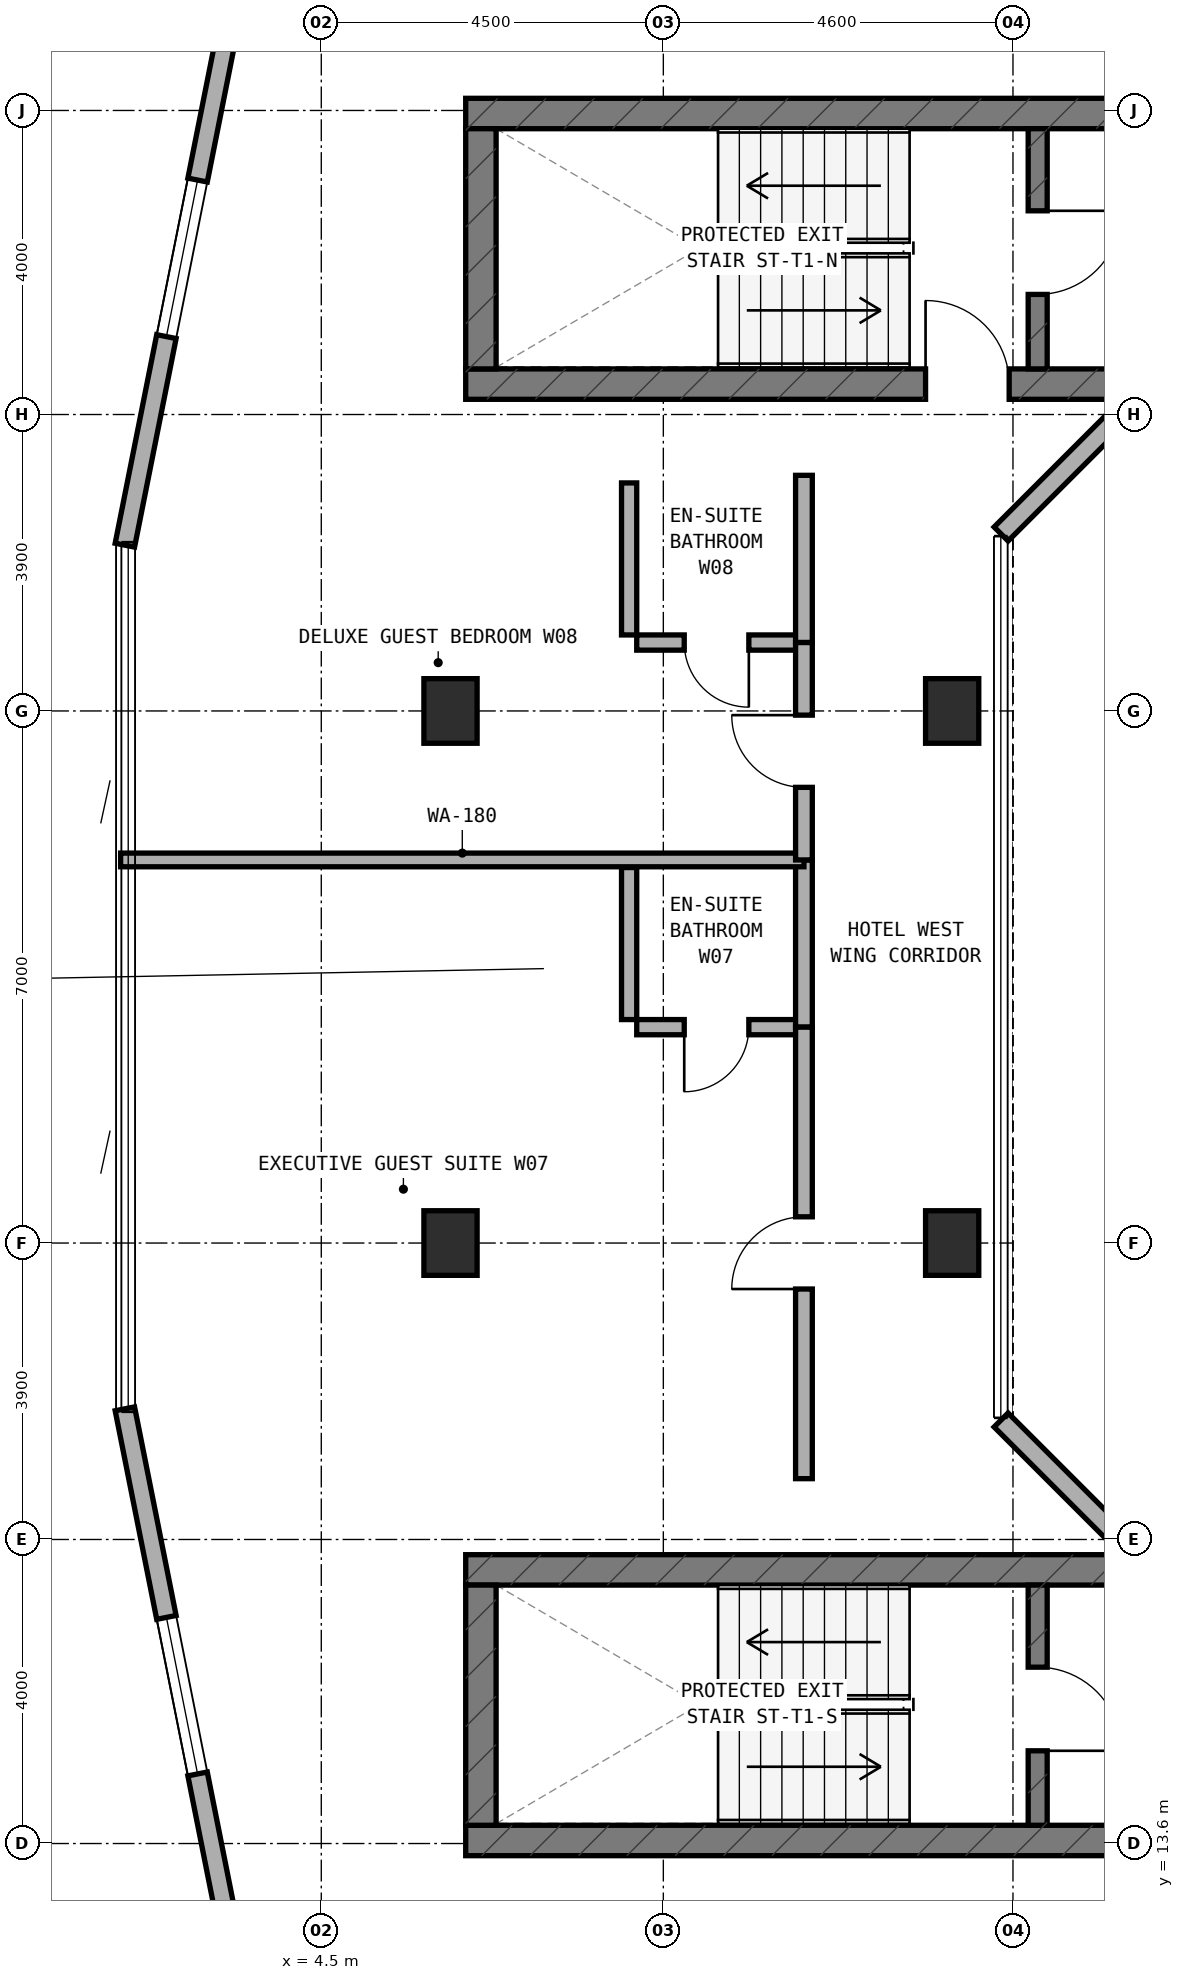
"""IFC4 building model, lengths in metres.
Left out: names, types, materials, properties, quantities, classifications, styles, units other than length and angle.
Written with IfcOpenShell. Run it as: python <this file> out.ifc"""

import sys

from ifc_helpers import new_model, si_unit, direction, frame, frame_2d, origin, origin_2d, place, context, subcontext, project, spatial, rectangle, extrude, element, fill, save


model = new_model("IFC4")
c1 = context("Model", 3, precision=1e-05, world=origin(), true_north=direction((0.0, 1.0)))
c2 = subcontext(c1, "Body", "Model", "MODEL_VIEW")
j1 = project(units=[si_unit("LENGTHUNIT", "METRE"), si_unit("PLANEANGLEUNIT", "RADIAN")], contexts=[c1])
p1 = place(None, origin())
s1 = spatial("IfcSite", under=j1, at=p1, CompositionType="ELEMENT")
p2 = place(p1, origin())
s2 = spatial("IfcBuilding", under=s1, at=p2, CompositionType="ELEMENT")
p3 = place(p2, frame((0.0, 0.0, 202.7)))
s3 = spatial("IfcBuildingStorey", under=s2, at=p3, CompositionType="ELEMENT", Elevation=202.7)
p4 = place(p3, frame((6.4, 32.8, 0.0), z_axis=(0.0, 0.0, 1.0), x_axis=(1.0, 0.0, 0.0)))
e1 = element("IfcWall", 1, at=p4, inside=s3, PredefinedType="SHEAR", context=c2, shape_type="SweptSolid", body=[
    extrude(rectangle(XDim=24.4, YDim=0.4, at=frame_2d((12.2, 0.0))), origin(), (0.0, 0.0, 1.0), 3.6),
])
p5 = place(p4, frame((6.05, 0.0, 0.0)))
e2 = element("IfcOpeningElement", 2, at=p5, cuts=e1, PredefinedType="OPENING", context=c2, shape_type="SweptSolid", body=[
    extrude(rectangle(XDim=1.1, YDim=2.15, at=frame_2d((0.55, 1.075))), frame((0.0, 0.21, 0.0), z_axis=(0.0, -1.0, 0.0), x_axis=(1.0, 0.0, 0.0)), (0.0, 0.0, 1.0), 0.42),
])
p6 = place(p3, frame((6.4, 36.36, 0.0), z_axis=(0.0, 0.0, 1.0), x_axis=(1.0, 0.0, 0.0)))
e3 = element("IfcWall", 3, at=p6, inside=s3, PredefinedType="SHEAR", context=c2, shape_type="SweptSolid", body=[
    extrude(rectangle(XDim=24.4, YDim=0.4, at=frame_2d((12.2, 0.0))), origin(), (0.0, 0.0, 1.0), 3.6),
])
p7 = place(p6, frame((9.15, 0.0, 0.0)))
e4 = element("IfcOpeningElement", 4, at=p7, cuts=e3, PredefinedType="OPENING", context=c2, shape_type="SweptSolid", body=[
    extrude(rectangle(XDim=1.2, YDim=2.15, at=frame_2d((0.6, 1.075))), frame((0.0, 0.21, 0.0), z_axis=(0.0, -1.0, 0.0), x_axis=(1.0, 0.0, 0.0)), (0.0, 0.0, 1.0), 0.42),
])
p8 = place(p6, frame((19.2, 0.0, 0.0)))
e5 = element("IfcOpeningElement", 5, at=p8, cuts=e3, PredefinedType="OPENING", context=c2, shape_type="SweptSolid", body=[
    extrude(rectangle(XDim=0.85, YDim=2.1, at=frame_2d((0.425, 1.05))), frame((0.0, 0.21, 0.0), z_axis=(0.0, -1.0, 0.0), x_axis=(1.0, 0.0, 0.0)), (0.0, 0.0, 1.0), 0.42),
])
p9 = place(p6, frame((16.94, 0.0, 0.0)))
e6 = element("IfcOpeningElement", 6, at=p9, cuts=e3, PredefinedType="OPENING", context=c2, shape_type="SweptSolid", body=[
    extrude(rectangle(XDim=0.85, YDim=2.1, at=frame_2d((0.425, 1.05))), frame((0.0, 0.21, 0.0), z_axis=(0.0, -1.0, 0.0), x_axis=(1.0, 0.0, 0.0)), (0.0, 0.0, 1.0), 0.42),
])
p10 = place(p3, frame((6.6, 33.0, 0.0), z_axis=(0.0, 0.0, 1.0), x_axis=(0.0, 1.0, 0.0)))
e7 = element("IfcWall", 7, at=p10, inside=s3, PredefinedType="SHEAR", context=c2, shape_type="SweptSolid", body=[
    extrude(rectangle(XDim=3.16, YDim=0.4, at=frame_2d((1.58, 0.0))), origin(), (0.0, 0.0, 1.0), 3.6),
])
p11 = place(p3, frame((13.925, 33.0, 0.0), z_axis=(0.0, 0.0, 1.0), x_axis=(0.0, 1.0, 0.0)))
e8 = element("IfcWall", 8, at=p11, inside=s3, PredefinedType="STANDARD", context=c2, shape_type="SweptSolid", body=[
    extrude(rectangle(XDim=3.16, YDim=0.25, at=frame_2d((1.58, 0.0))), origin(), (0.0, 0.0, 1.0), 3.32),
])
p12 = place(p11, frame((0.98, 0.0, 0.0)))
e9 = element("IfcOpeningElement", 9, at=p12, cuts=e8, PredefinedType="OPENING", context=c2, shape_type="SweptSolid", body=[
    extrude(rectangle(XDim=1.1, YDim=2.15, at=frame_2d((0.55, 1.075))), frame((0.0, 0.135, 0.0), z_axis=(0.0, -1.0, 0.0), x_axis=(1.0, 0.0, 0.0)), (0.0, 0.0, 1.0), 0.27),
])
p13 = place(p3, frame((6.4, 13.64, 0.0), z_axis=(0.0, 0.0, 1.0), x_axis=(1.0, 0.0, 0.0)))
e10 = element("IfcWall", 10, at=p13, inside=s3, PredefinedType="SHEAR", context=c2, shape_type="SweptSolid", body=[
    extrude(rectangle(XDim=24.4, YDim=0.4, at=frame_2d((12.2, 0.0))), origin(), (0.0, 0.0, 1.0), 3.6),
])
p14 = place(p13, frame((9.15, 0.0, 0.0)))
e11 = element("IfcOpeningElement", 11, at=p14, cuts=e10, PredefinedType="OPENING", context=c2, shape_type="SweptSolid", body=[
    extrude(rectangle(XDim=1.2, YDim=2.15, at=frame_2d((0.6, 1.075))), frame((0.0, 0.21, 0.0), z_axis=(0.0, -1.0, 0.0), x_axis=(1.0, 0.0, 0.0)), (0.0, 0.0, 1.0), 0.42),
])
p15 = place(p13, frame((16.94, 0.0, 0.0)))
e12 = element("IfcOpeningElement", 12, at=p15, cuts=e10, PredefinedType="OPENING", context=c2, shape_type="SweptSolid", body=[
    extrude(rectangle(XDim=0.85, YDim=2.1, at=frame_2d((0.425, 1.05))), frame((0.0, 0.21, 0.0), z_axis=(0.0, -1.0, 0.0), x_axis=(1.0, 0.0, 0.0)), (0.0, 0.0, 1.0), 0.42),
])
p16 = place(p13, frame((18.783, 0.0, 0.0)))
e13 = element("IfcOpeningElement", 13, at=p16, cuts=e10, PredefinedType="OPENING", context=c2, shape_type="SweptSolid", body=[
    extrude(rectangle(XDim=1.1, YDim=2.15, at=frame_2d((0.55, 1.075))), frame((0.0, 0.21, 0.0), z_axis=(0.0, -1.0, 0.0), x_axis=(1.0, 0.0, 0.0)), (0.0, 0.0, 1.0), 0.42),
])
p17 = place(p13, frame((20.65, 0.0, 0.0)))
e14 = element("IfcOpeningElement", 14, at=p17, cuts=e10, PredefinedType="OPENING", context=c2, shape_type="SweptSolid", body=[
    extrude(rectangle(XDim=1.1, YDim=2.15, at=frame_2d((0.55, 1.075))), frame((0.0, 0.21, 0.0), z_axis=(0.0, -1.0, 0.0), x_axis=(1.0, 0.0, 0.0)), (0.0, 0.0, 1.0), 0.42),
])
p18 = place(p13, frame((22.517, 0.0, 0.0)))
e15 = element("IfcOpeningElement", 15, at=p18, cuts=e10, PredefinedType="OPENING", context=c2, shape_type="SweptSolid", body=[
    extrude(rectangle(XDim=1.1, YDim=2.15, at=frame_2d((0.55, 1.075))), frame((0.0, 0.21, 0.0), z_axis=(0.0, -1.0, 0.0), x_axis=(1.0, 0.0, 0.0)), (0.0, 0.0, 1.0), 0.42),
])
p19 = place(p3, frame((6.4, 17.2, 0.0), z_axis=(0.0, 0.0, 1.0), x_axis=(1.0, 0.0, 0.0)))
e16 = element("IfcWall", 16, at=p19, inside=s3, PredefinedType="SHEAR", context=c2, shape_type="SweptSolid", body=[
    extrude(rectangle(XDim=24.4, YDim=0.4, at=frame_2d((12.2, 0.0))), origin(), (0.0, 0.0, 1.0), 3.6),
])
p20 = place(p3, frame((6.6, 13.84, 0.0), z_axis=(0.0, 0.0, 1.0), x_axis=(0.0, 1.0, 0.0)))
e17 = element("IfcWall", 17, at=p20, inside=s3, PredefinedType="SHEAR", context=c2, shape_type="SweptSolid", body=[
    extrude(rectangle(XDim=3.16, YDim=0.4, at=frame_2d((1.58, 0.0))), origin(), (0.0, 0.0, 1.0), 3.6),
])
p21 = place(p3, frame((13.925, 13.84, 0.0), z_axis=(0.0, 0.0, 1.0), x_axis=(0.0, 1.0, 0.0)))
e18 = element("IfcWall", 18, at=p21, inside=s3, PredefinedType="STANDARD", context=c2, shape_type="SweptSolid", body=[
    extrude(rectangle(XDim=3.16, YDim=0.25, at=frame_2d((1.58, 0.0))), origin(), (0.0, 0.0, 1.0), 3.32),
])
p22 = place(p21, frame((0.98, 0.0, 0.0)))
e19 = element("IfcOpeningElement", 19, at=p22, cuts=e18, PredefinedType="OPENING", context=c2, shape_type="SweptSolid", body=[
    extrude(rectangle(XDim=1.1, YDim=2.15, at=frame_2d((0.55, 1.075))), frame((0.0, 0.135, 0.0), z_axis=(0.0, -1.0, 0.0), x_axis=(1.0, 0.0, 0.0)), (0.0, 0.0, 1.0), 0.27),
])
for number, where, z_axis, x_axis in (
    (20, (6.2, 21.5, 0.0), (0.0, 0.0, 1.0), (1.0, 0.0, 0.0)),
    (21, (6.2, 28.5, 0.0), (0.0, 0.0, 1.0), (1.0, 0.0, 0.0)),
    (22, (12.8, 21.5, 0.0), (0.0, 0.0, 1.0), (1.0, 0.0, 0.0)),
    (23, (12.8, 28.5, 0.0), (0.0, 0.0, 1.0), (1.0, 0.0, 0.0)),
):
    element("IfcColumn", number, at=place(p3, frame(where, z_axis=z_axis, x_axis=x_axis)), inside=s3, PredefinedType="COLUMN", context=c2, shape_type="SweptSolid", body=[
        extrude(rectangle(XDim=0.7, YDim=0.85, at=origin_2d()), origin(), (0.0, 0.0, 1.0), 3.6),
    ])
p23 = place(p3, frame((3.629, 39.283, 0.0), z_axis=(0.0, 0.0, 1.0), x_axis=(-0.195291715883, -0.980745199176, 0.0)))
e24 = element("IfcWall", 24, at=p23, inside=s3, PredefinedType="STANDARD", context=c2, shape_type="SweptSolid", body=[
    extrude(rectangle(XDim=8.771, YDim=0.26, at=frame_2d((4.385, 0.0))), origin(), (0.0, 0.0, 1.0), 3.32),
])
p24 = place(p23, frame((3.873, 0.0, 0.85)))
e25 = element("IfcOpeningElement", 25, at=p24, cuts=e24, PredefinedType="OPENING", context=c2, shape_type="SweptSolid", body=[
    extrude(rectangle(XDim=2.1, YDim=1.5, at=frame_2d((1.05, 0.75))), frame((0.0, 0.14, 0.0), z_axis=(0.0, -1.0, 0.0), x_axis=(1.0, 0.0, 0.0)), (0.0, 0.0, 1.0), 0.28),
])
p25 = place(p3, frame((1.916, 19.319, 0.0), z_axis=(0.0, 0.0, 1.0), x_axis=(0.195291715883, -0.980745199176, 0.0)))
e26 = element("IfcWall", 26, at=p25, inside=s3, PredefinedType="STANDARD", context=c2, shape_type="SweptSolid", body=[
    extrude(rectangle(XDim=8.771, YDim=0.26, at=frame_2d((4.385, 0.0))), origin(), (0.0, 0.0, 1.0), 3.32),
])
p26 = place(p25, frame((2.798, 0.0, 0.85)))
e27 = element("IfcOpeningElement", 27, at=p26, cuts=e26, PredefinedType="OPENING", context=c2, shape_type="SweptSolid", body=[
    extrude(rectangle(XDim=2.1, YDim=1.5, at=frame_2d((1.05, 0.75))), frame((0.0, 0.14, 0.0), z_axis=(0.0, -1.0, 0.0), x_axis=(1.0, 0.0, 0.0)), (0.0, 0.0, 1.0), 0.28),
])
for number, where, z_axis, x_axis in (
    (28, (15.278, 32.662, 0.0), (0.0, 0.0, 1.0), (-0.707, -0.707, 0.0)),
    (29, (13.444, 19.172, 0.0), (0.0, 0.0, 1.0), (0.707, -0.707, 0.0)),
):
    element("IfcWall", number, at=place(p3, frame(where, z_axis=z_axis, x_axis=x_axis)), inside=s3, PredefinedType="STANDARD", context=c2, shape_type="SweptSolid", body=[
        extrude(rectangle(XDim=2.594, YDim=0.26, at=frame_2d((1.297, 0.0))), origin(), (0.0, 0.0, 1.0), 3.32),
    ])
p27 = place(p3, frame((8.65, 24.34, 0.0), z_axis=(0.0, 0.0, 1.0), x_axis=(1.0, 0.0, 0.0)))
e30 = element("IfcWall", 30, at=p27, inside=s3, PredefinedType="PLUMBINGWALL", context=c2, shape_type="SweptSolid", body=[
    extrude(rectangle(XDim=2.1, YDim=0.2, at=frame_2d((1.05, 0.0))), origin(), (0.0, 0.0, 1.0), 3.32),
])
p28 = place(p27, frame((0.625, 0.0, 0.0)))
e31 = element("IfcOpeningElement", 31, at=p28, cuts=e30, PredefinedType="OPENING", context=c2, shape_type="SweptSolid", body=[
    extrude(rectangle(XDim=0.85, YDim=2.1, at=frame_2d((0.425, 1.05))), frame((0.0, 0.11, 0.0), z_axis=(0.0, -1.0, 0.0), x_axis=(1.0, 0.0, 0.0)), (0.0, 0.0, 1.0), 0.22),
])
p29 = place(p3, frame((8.55, 24.44, 0.0), z_axis=(0.0, 0.0, 1.0), x_axis=(0.0, 1.0, 0.0)))
e32 = element("IfcWall", 32, at=p29, inside=s3, PredefinedType="PLUMBINGWALL", context=c2, shape_type="SweptSolid", body=[
    extrude(rectangle(XDim=2.0, YDim=0.2, at=frame_2d((1.0, 0.0))), origin(), (0.0, 0.0, 1.0), 3.32),
])
p30 = place(p3, frame((10.85, 24.34, 0.0), z_axis=(0.0, 0.0, 1.0), x_axis=(0.0, 1.0, 0.0)))
e33 = element("IfcWall", 33, at=p30, inside=s3, PredefinedType="SOLIDWALL", context=c2, shape_type="SweptSolid", body=[
    extrude(rectangle(XDim=2.2, YDim=0.22, at=frame_2d((1.1, 0.0))), origin(), (0.0, 0.0, 1.0), 3.32),
])
p31 = place(p3, frame((10.85, 18.4, 0.0), z_axis=(0.0, 0.0, 1.0), x_axis=(0.0, 1.0, 0.0)))
e34 = element("IfcWall", 34, at=p31, inside=s3, PredefinedType="SOLIDWALL", context=c2, shape_type="SweptSolid", body=[
    extrude(rectangle(XDim=5.94, YDim=0.22, at=frame_2d((2.97, 0.0))), origin(), (0.0, 0.0, 1.0), 2.695),
])
p32 = place(p31, frame((2.495, 0.0, 0.0)))
e35 = element("IfcOpeningElement", 35, at=p32, cuts=e34, PredefinedType="OPENING", context=c2, shape_type="SweptSolid", body=[
    extrude(rectangle(XDim=0.95, YDim=2.1, at=frame_2d((0.475, 1.05))), frame((0.0, 0.12, 0.0), z_axis=(0.0, -1.0, 0.0), x_axis=(1.0, 0.0, 0.0)), (0.0, 0.0, 1.0), 0.24),
])
p33 = place(p3, frame((1.86, 26.54, 0.0), z_axis=(0.0, 0.0, 1.0), x_axis=(1.0, 0.0, 0.0)))
e36 = element("IfcWall", 36, at=p33, inside=s3, PredefinedType="SOLIDWALL", context=c2, shape_type="SweptSolid", body=[
    extrude(rectangle(XDim=8.99, YDim=0.18, at=frame_2d((4.495, 0.0))), origin(), (0.0, 0.0, 1.0), 3.015),
])
p34 = place(p3, frame((8.65, 29.4, 0.0), z_axis=(0.0, 0.0, 1.0), x_axis=(1.0, 0.0, 0.0)))
e37 = element("IfcWall", 37, at=p34, inside=s3, PredefinedType="PLUMBINGWALL", context=c2, shape_type="SweptSolid", body=[
    extrude(rectangle(XDim=2.1, YDim=0.2, at=frame_2d((1.05, 0.0))), origin(), (0.0, 0.0, 1.0), 3.32),
])
p35 = place(p34, frame((0.625, 0.0, 0.0)))
e38 = element("IfcOpeningElement", 38, at=p35, cuts=e37, PredefinedType="OPENING", context=c2, shape_type="SweptSolid", body=[
    extrude(rectangle(XDim=0.85, YDim=2.1, at=frame_2d((0.425, 1.05))), frame((0.0, 0.11, 0.0), z_axis=(0.0, -1.0, 0.0), x_axis=(1.0, 0.0, 0.0)), (0.0, 0.0, 1.0), 0.22),
])
p36 = place(p3, frame((8.55, 29.5, 0.0), z_axis=(0.0, 0.0, 1.0), x_axis=(0.0, 1.0, 0.0)))
e39 = element("IfcWall", 39, at=p36, inside=s3, PredefinedType="PLUMBINGWALL", context=c2, shape_type="SweptSolid", body=[
    extrude(rectangle(XDim=2.0, YDim=0.2, at=frame_2d((1.0, 0.0))), origin(), (0.0, 0.0, 1.0), 3.32),
])
p37 = place(p3, frame((10.85, 29.4, 0.0), z_axis=(0.0, 0.0, 1.0), x_axis=(0.0, 1.0, 0.0)))
e40 = element("IfcWall", 40, at=p37, inside=s3, PredefinedType="SOLIDWALL", context=c2, shape_type="SweptSolid", body=[
    extrude(rectangle(XDim=2.2, YDim=0.22, at=frame_2d((1.1, 0.0))), origin(), (0.0, 0.0, 1.0), 3.32),
])
p38 = place(p3, frame((10.85, 26.54, 0.0), z_axis=(0.0, 0.0, 1.0), x_axis=(0.0, 1.0, 0.0)))
e41 = element("IfcWall", 41, at=p38, inside=s3, PredefinedType="SOLIDWALL", context=c2, shape_type="SweptSolid", body=[
    extrude(rectangle(XDim=2.86, YDim=0.22, at=frame_2d((1.43, 0.0))), origin(), (0.0, 0.0, 1.0), 2.695),
])
p39 = place(p38, frame((0.955, 0.0, 0.0)))
e42 = element("IfcOpeningElement", 42, at=p39, cuts=e41, PredefinedType="OPENING", context=c2, shape_type="SweptSolid", body=[
    extrude(rectangle(XDim=0.95, YDim=2.1, at=frame_2d((0.475, 1.05))), frame((0.0, 0.12, 0.0), z_axis=(0.0, -1.0, 0.0), x_axis=(1.0, 0.0, 0.0)), (0.0, 0.0, 1.0), 0.24),
])
p40 = place(p24, origin())
e43 = element("IfcWindow", 43, at=p40, inside=s3, PartitioningType="SINGLE_PANEL", PredefinedType="WINDOW", context=c2, shape_type="SweptSolid", body=[
    extrude(rectangle(XDim=2.1, YDim=1.5, at=frame_2d((1.05, 0.75))), frame((0.0, 0.03, 0.0), z_axis=(0.0, -1.0, 0.0), x_axis=(1.0, 0.0, 0.0)), (0.0, 0.0, 1.0), 0.06),
])
fill(e25, e43)
p41 = place(p26, origin())
e44 = element("IfcWindow", 44, at=p41, inside=s3, PartitioningType="SINGLE_PANEL", PredefinedType="WINDOW", context=c2, shape_type="SweptSolid", body=[
    extrude(rectangle(XDim=2.1, YDim=1.5, at=frame_2d((1.05, 0.75))), frame((0.0, 0.03, 0.0), z_axis=(0.0, -1.0, 0.0), x_axis=(1.0, 0.0, 0.0)), (0.0, 0.0, 1.0), 0.06),
])
fill(e27, e44)
p42 = place(p12, frame((1.1, 0.0, 0.0), z_axis=(0.0, 0.0, 1.0), x_axis=(-1.0, 0.0, 0.0)))
e45 = element("IfcDoor", 45, at=p42, inside=s3, OperationType="SINGLE_SWING_LEFT", PredefinedType="DOOR", context=c2, shape_type="SweptSolid", body=[
    extrude(rectangle(XDim=1.1, YDim=2.15, at=frame_2d((0.55, 1.075))), frame((0.0, 0.025, 0.0), z_axis=(0.0, -1.0, 0.0), x_axis=(1.0, 0.0, 0.0)), (0.0, 0.0, 1.0), 0.05),
])
fill(e9, e45)
p43 = place(p22, frame((1.1, 0.0, 0.0), z_axis=(0.0, 0.0, 1.0), x_axis=(-1.0, 0.0, 0.0)))
e46 = element("IfcDoor", 46, at=p43, inside=s3, OperationType="SINGLE_SWING_RIGHT", PredefinedType="DOOR", context=c2, shape_type="SweptSolid", body=[
    extrude(rectangle(XDim=1.1, YDim=2.15, at=frame_2d((0.55, 1.075))), frame((0.0, 0.025, 0.0), z_axis=(0.0, -1.0, 0.0), x_axis=(1.0, 0.0, 0.0)), (0.0, 0.0, 1.0), 0.05),
])
fill(e19, e46)
p44 = place(p5, origin())
e47 = element("IfcDoor", 47, at=p44, inside=s3, OperationType="SINGLE_SWING_LEFT", PredefinedType="DOOR", context=c2, shape_type="SweptSolid", body=[
    extrude(rectangle(XDim=1.1, YDim=2.15, at=frame_2d((0.55, 1.075))), frame((0.0, 0.025, 0.0), z_axis=(0.0, -1.0, 0.0), x_axis=(1.0, 0.0, 0.0)), (0.0, 0.0, 1.0), 0.05),
])
fill(e2, e47)
p45 = place(p28, frame((0.85, 0.0, 0.0), z_axis=(0.0, 0.0, 1.0), x_axis=(-1.0, 0.0, 0.0)))
e48 = element("IfcDoor", 48, at=p45, inside=s3, OperationType="SINGLE_SWING_RIGHT", PredefinedType="DOOR", context=c2, shape_type="SweptSolid", body=[
    extrude(rectangle(XDim=0.85, YDim=2.1, at=frame_2d((0.425, 1.05))), frame((0.0, 0.025, 0.0), z_axis=(0.0, -1.0, 0.0), x_axis=(1.0, 0.0, 0.0)), (0.0, 0.0, 1.0), 0.05),
])
fill(e31, e48)
p46 = place(p32, origin())
e49 = element("IfcDoor", 49, at=p46, inside=s3, OperationType="SINGLE_SWING_LEFT", PredefinedType="DOOR", context=c2, shape_type="SweptSolid", body=[
    extrude(rectangle(XDim=0.95, YDim=2.1, at=frame_2d((0.475, 1.05))), frame((0.0, 0.025, 0.0), z_axis=(0.0, -1.0, 0.0), x_axis=(1.0, 0.0, 0.0)), (0.0, 0.0, 1.0), 0.05),
])
fill(e35, e49)
p47 = place(p35, frame((0.85, 0.0, 0.0), z_axis=(0.0, 0.0, 1.0), x_axis=(-1.0, 0.0, 0.0)))
e50 = element("IfcDoor", 50, at=p47, inside=s3, OperationType="SINGLE_SWING_LEFT", PredefinedType="DOOR", context=c2, shape_type="SweptSolid", body=[
    extrude(rectangle(XDim=0.85, YDim=2.1, at=frame_2d((0.425, 1.05))), frame((0.0, 0.025, 0.0), z_axis=(0.0, -1.0, 0.0), x_axis=(1.0, 0.0, 0.0)), (0.0, 0.0, 1.0), 0.05),
])
fill(e38, e50)
p48 = place(p39, origin())
e51 = element("IfcDoor", 51, at=p48, inside=s3, OperationType="SINGLE_SWING_RIGHT", PredefinedType="DOOR", context=c2, shape_type="SweptSolid", body=[
    extrude(rectangle(XDim=0.95, YDim=2.1, at=frame_2d((0.475, 1.05))), frame((0.0, 0.025, 0.0), z_axis=(0.0, -1.0, 0.0), x_axis=(1.0, 0.0, 0.0)), (0.0, 0.0, 1.0), 0.05),
])
fill(e42, e51)
save(model, sys.argv[1])
